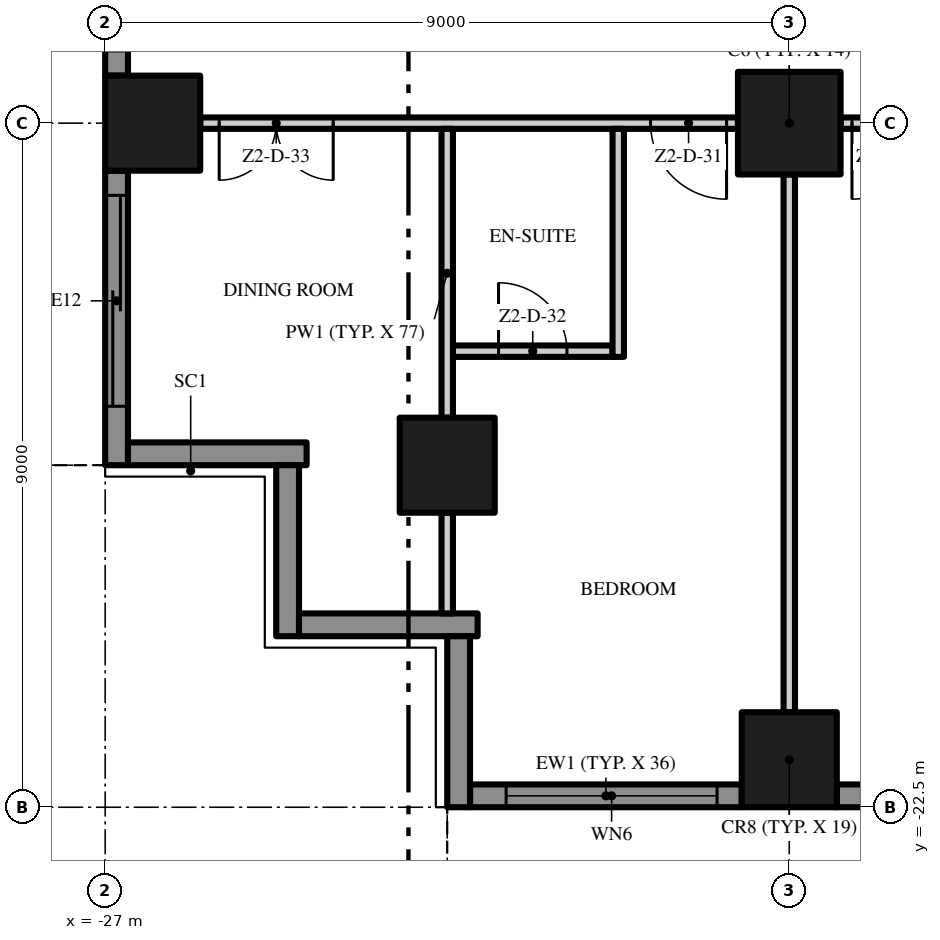
"""IFC4 building model, lengths in metres.
Left out: names, types, materials, properties, quantities, classifications, styles, units other than length and angle.
Written with IfcOpenShell. Run it as: python <this file> out.ifc"""

import sys

from ifc_helpers import new_model, si_unit, direction, frame, frame_2d, origin, origin_2d, place, context, subcontext, project, spatial, polyline, rectangle, outline, extrude, element, fill, save


model = new_model("IFC4")
c1 = context("Model", 3, precision=1e-05, world=origin(), true_north=direction((0.0, 1.0)))
c2 = subcontext(c1, "Body", "Model", "MODEL_VIEW")
j1 = project(units=[si_unit("LENGTHUNIT", "METRE"), si_unit("PLANEANGLEUNIT", "RADIAN")], contexts=[c1])
p1 = place(None, origin())
s1 = spatial("IfcSite", under=j1, at=p1, CompositionType="ELEMENT")
p2 = place(p1, origin())
s2 = spatial("IfcBuilding", under=s1, at=p2, CompositionType="ELEMENT")
p3 = place(p2, frame((0.0, 0.0, 103.6)))
s3 = spatial("IfcBuildingStorey", under=s2, at=p3, CompositionType="ELEMENT", Elevation=103.6)
p4 = place(p3, frame((-18.0, -13.5, 0.0), z_axis=(0.0, 0.0, 1.0), x_axis=(1.0, 0.0, 0.0)))
e1 = element("IfcColumn", 1, at=p4, inside=s3, PredefinedType="COLUMN", context=c2, shape_type="SweptSolid", body=[
    extrude(rectangle(XDim=1.35, YDim=1.35, at=origin_2d()), origin(), (0.0, 0.0, 1.0), 3.5),
])
for number, where, z_axis, x_axis in (
    (2, (-18.0, -21.875, 0.0), (0.0, 0.0, 1.0), (1.0, 0.0, 0.0)),
    (3, (-26.375, -13.5, 0.0), (0.0, 0.0, 1.0), (1.0, 0.0, 0.0)),
    (4, (-22.5, -18.0, 0.0), (0.0, 0.0, 1.0), (1.0, 0.0, 0.0)),
):
    element("IfcColumn", number, at=place(p3, frame(where, z_axis=z_axis, x_axis=x_axis)), inside=s3, PredefinedType="COLUMN", context=c2, shape_type="SweptSolid", body=[
        extrude(rectangle(XDim=1.25, YDim=1.25, at=origin_2d()), origin(), (0.0, 0.0, 1.0), 3.5),
    ])
p5 = place(p3, frame((-18.625, -22.35, 0.0), z_axis=(0.0, 0.0, 1.0), x_axis=(-1.0, 0.0, 0.0)))
e5 = element("IfcWall", 5, at=p5, inside=s3, PredefinedType="SOLIDWALL", context=c2, shape_type="SweptSolid", body=[
    extrude(rectangle(XDim=3.575, YDim=0.3, at=frame_2d((1.788, 0.0))), origin(), (0.0, 0.0, 1.0), 3.5),
])
p6 = place(p5, frame((0.325, 0.0, 0.45)))
e6 = element("IfcOpeningElement", 6, at=p6, cuts=e5, PredefinedType="OPENING", context=c2, shape_type="SweptSolid", body=[
    extrude(rectangle(XDim=2.775, YDim=2.65, at=frame_2d((1.387, 1.325))), frame((0.0, 0.16, 0.0), z_axis=(0.0, -1.0, 0.0), x_axis=(1.0, 0.0, 0.0)), (0.0, 0.0, 1.0), 0.32),
])
p7 = place(p3, frame((-9.625, -22.35, 0.0), z_axis=(0.0, 0.0, 1.0), x_axis=(-1.0, 0.0, 0.0)))
e7 = element("IfcWall", 7, at=p7, inside=s3, PredefinedType="SOLIDWALL", context=c2, shape_type="SweptSolid", body=[
    extrude(rectangle(XDim=7.75, YDim=0.3, at=frame_2d((3.875, 0.0))), origin(), (0.0, 0.0, 1.0), 3.5),
])
p8 = place(p7, frame((4.65, 0.0, 0.0)))
e8 = element("IfcOpeningElement", 8, at=p8, cuts=e7, PredefinedType="OPENING", context=c2, shape_type="SweptSolid", body=[
    extrude(rectangle(XDim=2.775, YDim=2.4, at=frame_2d((1.387, 1.2))), frame((0.0, 0.16, 0.0), z_axis=(0.0, -1.0, 0.0), x_axis=(1.0, 0.0, 0.0)), (0.0, 0.0, 1.0), 0.32),
])
p9 = place(p7, frame((0.325, 0.0, 0.45)))
e9 = element("IfcOpeningElement", 9, at=p9, cuts=e7, PredefinedType="OPENING", context=c2, shape_type="SweptSolid", body=[
    extrude(rectangle(XDim=2.775, YDim=2.65, at=frame_2d((1.387, 1.325))), frame((0.0, 0.16, 0.0), z_axis=(0.0, -1.0, 0.0), x_axis=(1.0, 0.0, 0.0)), (0.0, 0.0, 1.0), 0.32),
])
p10 = place(p3, frame((-26.85, -12.875, 0.0), z_axis=(0.0, 0.0, 1.0), x_axis=(0.0, 1.0, 0.0)))
e10 = element("IfcWall", 10, at=p10, inside=s3, PredefinedType="SOLIDWALL", context=c2, shape_type="SweptSolid", body=[
    extrude(rectangle(XDim=7.75, YDim=0.3, at=frame_2d((3.875, 0.0))), origin(), (0.0, 0.0, 1.0), 3.5),
])
p11 = place(p10, frame((4.65, 0.0, 0.45)))
e11 = element("IfcOpeningElement", 11, at=p11, cuts=e10, PredefinedType="OPENING", context=c2, shape_type="SweptSolid", body=[
    extrude(rectangle(XDim=2.775, YDim=2.65, at=frame_2d((1.387, 1.325))), frame((0.0, 0.16, 0.0), z_axis=(0.0, -1.0, 0.0), x_axis=(1.0, 0.0, 0.0)), (0.0, 0.0, 1.0), 0.32),
])
p12 = place(p10, frame((0.325, 0.0, 0.45)))
e12 = element("IfcOpeningElement", 12, at=p12, cuts=e10, PredefinedType="OPENING", context=c2, shape_type="SweptSolid", body=[
    extrude(rectangle(XDim=2.775, YDim=2.65, at=frame_2d((1.387, 1.325))), frame((0.0, 0.16, 0.0), z_axis=(0.0, -1.0, 0.0), x_axis=(1.0, 0.0, 0.0)), (0.0, 0.0, 1.0), 0.32),
])
p13 = place(p3, frame((-26.85, -18.0, 0.0), z_axis=(0.0, 0.0, 1.0), x_axis=(0.0, 1.0, 0.0)))
e13 = element("IfcWall", 13, at=p13, inside=s3, PredefinedType="SOLIDWALL", context=c2, shape_type="SweptSolid", body=[
    extrude(rectangle(XDim=3.875, YDim=0.3, at=frame_2d((1.938, 0.0))), origin(), (0.0, 0.0, 1.0), 3.5),
])
p14 = place(p13, frame((0.775, 0.0, 0.0)))
e14 = element("IfcOpeningElement", 14, at=p14, cuts=e13, PredefinedType="OPENING", context=c2, shape_type="SweptSolid", body=[
    extrude(rectangle(XDim=2.775, YDim=2.4, at=frame_2d((1.387, 1.2))), frame((0.0, 0.16, 0.0), z_axis=(0.0, -1.0, 0.0), x_axis=(1.0, 0.0, 0.0)), (0.0, 0.0, 1.0), 0.32),
])
p15 = place(p3, frame((-24.35, -17.85, 0.0), z_axis=(0.0, 0.0, 1.0), x_axis=(-1.0, 0.0, 0.0)))
e15 = element("IfcWall", 15, at=p15, inside=s3, PredefinedType="SOLIDWALL", context=c2, shape_type="SweptSolid", body=[
    extrude(rectangle(XDim=2.35, YDim=0.3, at=frame_2d((1.175, 0.0))), origin(), (0.0, 0.0, 1.0), 3.5),
])
p16 = place(p3, frame((-24.6, -20.25, 0.0), z_axis=(0.0, 0.0, 1.0), x_axis=(0.0, 1.0, 0.0)))
e16 = element("IfcWall", 16, at=p16, inside=s3, PredefinedType="SOLIDWALL", context=c2, shape_type="SweptSolid", body=[
    extrude(rectangle(XDim=2.25, YDim=0.3, at=frame_2d((1.125, 0.0))), origin(), (0.0, 0.0, 1.0), 3.5),
])
p17 = place(p3, frame((-22.1, -20.1, 0.0), z_axis=(0.0, 0.0, 1.0), x_axis=(-1.0, 0.0, 0.0)))
e17 = element("IfcWall", 17, at=p17, inside=s3, PredefinedType="SOLIDWALL", context=c2, shape_type="SweptSolid", body=[
    extrude(rectangle(XDim=2.35, YDim=0.3, at=frame_2d((1.175, 0.0))), origin(), (0.0, 0.0, 1.0), 3.5),
])
p18 = place(p3, frame((-22.35, -22.5, 0.0), z_axis=(0.0, 0.0, 1.0), x_axis=(0.0, 1.0, 0.0)))
e18 = element("IfcWall", 18, at=p18, inside=s3, PredefinedType="SOLIDWALL", context=c2, shape_type="SweptSolid", body=[
    extrude(rectangle(XDim=2.25, YDim=0.3, at=frame_2d((1.125, 0.0))), origin(), (0.0, 0.0, 1.0), 3.5),
])
p19 = place(p3, origin())
e19 = element("IfcWall", 19, at=p19, inside=s3, PredefinedType="USERDEFINED", context=c2, shape_type="SweptSolid", body=[
    extrude(outline(polyline([(-22.5, -23.451), (-21.0, -24.112), (-19.5, -24.845), (-18.0, -25.369), (-16.875, -25.5), (-16.5, -25.485), (-15.0, -25.149), (-13.5, -24.488), (-12.0, -23.755), (-10.5, -23.231), (-9.375, -23.1), (-9.0, -23.115), (-7.5, -23.451), (-6.0, -24.112), (-4.5, -24.845), (-3.0, -25.369), (-1.875, -25.5), (-1.5, -25.485), (0.0, -25.149), (1.5, -24.488), (3.0, -23.755), (4.5, -23.231), (5.625, -23.1), (6.0, -23.115), (7.5, -23.451), (9.0, -24.112), (10.5, -24.845), (12.0, -25.369), (13.125, -25.5), (13.5, -25.485), (15.0, -25.149), (16.5, -24.488), (18.0, -23.755), (19.5, -23.231), (20.625, -23.1), (21.0, -23.115), (22.5, -23.451), (22.555, -23.208), (21.033, -22.866), (20.615, -22.849), (19.444, -22.986), (17.904, -23.524), (16.395, -24.261), (14.921, -24.91), (13.467, -25.236), (13.135, -25.249), (12.056, -25.124), (10.596, -24.614), (9.105, -23.885), (7.579, -23.213), (6.033, -22.866), (5.615, -22.849), (4.444, -22.986), (2.904, -23.524), (1.395, -24.261), (-0.079, -24.91), (-1.533, -25.236), (-1.865, -25.249), (-2.944, -25.124), (-4.404, -24.614), (-5.895, -23.885), (-7.421, -23.213), (-8.967, -22.866), (-9.385, -22.849), (-10.556, -22.986), (-12.096, -23.524), (-13.605, -24.261), (-15.079, -24.91), (-16.533, -25.236), (-16.865, -25.249), (-17.944, -25.124), (-19.404, -24.614), (-20.895, -23.885), (-22.399, -23.223), (-22.5, -23.451)])), origin(), (0.0, 0.0, 1.0), 0.9),
])
p20 = place(p3, origin())
e20 = element("IfcWall", 20, at=p20, inside=s3, PredefinedType="USERDEFINED", context=c2, shape_type="SweptSolid", body=[
    extrude(outline(polyline([(-27.951, 18.0), (-28.612, 16.5), (-29.345, 15.0), (-29.869, 13.5), (-30.0, 12.375), (-29.985, 12.0), (-29.649, 10.5), (-28.988, 9.0), (-28.255, 7.5), (-27.731, 6.0), (-27.6, 4.875), (-27.615, 4.5), (-27.951, 3.0), (-28.612, 1.5), (-29.345, 0.0), (-29.869, -1.5), (-30.0, -2.625), (-29.985, -3.0), (-29.649, -4.5), (-28.988, -6.0), (-28.255, -7.5), (-27.731, -9.0), (-27.6, -10.125), (-27.615, -10.5), (-27.951, -12.0), (-28.612, -13.5), (-29.345, -15.0), (-29.869, -16.5), (-30.0, -17.625), (-29.985, -18.0), (-29.735, -17.99), (-29.749, -17.635), (-29.624, -16.556), (-29.114, -15.096), (-28.385, -13.605), (-27.713, -12.079), (-27.366, -10.533), (-27.349, -10.115), (-27.486, -8.944), (-28.024, -7.404), (-28.761, -5.895), (-29.41, -4.421), (-29.736, -2.967), (-29.749, -2.635), (-29.624, -1.556), (-29.114, -0.096), (-28.385, 1.395), (-27.713, 2.921), (-27.366, 4.467), (-27.349, 4.885), (-27.486, 6.056), (-28.024, 7.596), (-28.761, 9.105), (-29.41, 10.579), (-29.736, 12.033), (-29.749, 12.365), (-29.624, 13.444), (-29.114, 14.904), (-28.385, 16.395), (-27.723, 17.899), (-27.951, 18.0)])), origin(), (0.0, 0.0, 1.0), 0.9),
])
p21 = place(p3, frame((-22.425, -16.5, 0.0), z_axis=(0.0, 0.0, 1.0), x_axis=(1.0, 0.0, 0.0)))
e21 = element("IfcWall", 21, at=p21, inside=s3, PredefinedType="PARTITIONING", context=c2, shape_type="SweptSolid", body=[
    extrude(rectangle(XDim=2.1, YDim=0.15, at=frame_2d((1.05, 0.0))), origin(), (0.0, 0.0, 1.0), 3.5),
])
p22 = place(p21, frame((0.6, 0.0, 0.0)))
e22 = element("IfcOpeningElement", 22, at=p22, cuts=e21, PredefinedType="OPENING", context=c2, shape_type="SweptSolid", body=[
    extrude(rectangle(XDim=0.9, YDim=2.1, at=frame_2d((0.45, 1.05))), frame((0.0, 0.085, 0.0), z_axis=(0.0, -1.0, 0.0), x_axis=(1.0, 0.0, 0.0)), (0.0, 0.0, 1.0), 0.17),
])
p23 = place(p3, frame((-18.675, -13.5, 0.0), z_axis=(0.0, 0.0, 1.0), x_axis=(-1.0, 0.0, 0.0)))
e23 = element("IfcWall", 23, at=p23, inside=s3, PredefinedType="PARTITIONING", context=c2, shape_type="SweptSolid", body=[
    extrude(rectangle(XDim=7.075, YDim=0.15, at=frame_2d((3.538, 0.0))), origin(), (0.0, 0.0, 1.0), 3.5),
])
p24 = place(p23, frame((0.15, 0.0, 0.0)))
e24 = element("IfcOpeningElement", 24, at=p24, cuts=e23, PredefinedType="OPENING", context=c2, shape_type="SweptSolid", body=[
    extrude(rectangle(XDim=1.0, YDim=2.4, at=frame_2d((0.5, 1.2))), frame((0.0, 0.085, 0.0), z_axis=(0.0, -1.0, 0.0), x_axis=(1.0, 0.0, 0.0)), (0.0, 0.0, 1.0), 0.17),
])
p25 = place(p23, frame((5.325, 0.0, 0.0)))
e25 = element("IfcOpeningElement", 25, at=p25, cuts=e23, PredefinedType="OPENING", context=c2, shape_type="SweptSolid", body=[
    extrude(rectangle(XDim=1.5, YDim=2.4, at=frame_2d((0.75, 1.2))), frame((0.0, 0.085, 0.0), z_axis=(0.0, -1.0, 0.0), x_axis=(1.0, 0.0, 0.0)), (0.0, 0.0, 1.0), 0.17),
])
p26 = place(p3, frame((-9.675, -13.5, 0.0), z_axis=(0.0, 0.0, 1.0), x_axis=(-1.0, 0.0, 0.0)))
e26 = element("IfcWall", 26, at=p26, inside=s3, PredefinedType="PARTITIONING", context=c2, shape_type="SweptSolid", body=[
    extrude(rectangle(XDim=7.65, YDim=0.15, at=frame_2d((3.825, 0.0))), origin(), (0.0, 0.0, 1.0), 3.5),
])
p27 = place(p26, frame((0.15, 0.0, 0.0)))
e27 = element("IfcOpeningElement", 27, at=p27, cuts=e26, PredefinedType="OPENING", context=c2, shape_type="SweptSolid", body=[
    extrude(rectangle(XDim=1.0, YDim=2.4, at=frame_2d((0.5, 1.2))), frame((0.0, 0.085, 0.0), z_axis=(0.0, -1.0, 0.0), x_axis=(1.0, 0.0, 0.0)), (0.0, 0.0, 1.0), 0.17),
])
p28 = place(p26, frame((6.5, 0.0, 0.0)))
e28 = element("IfcOpeningElement", 28, at=p28, cuts=e26, PredefinedType="OPENING", context=c2, shape_type="SweptSolid", body=[
    extrude(rectangle(XDim=1.0, YDim=2.4, at=frame_2d((0.5, 1.2))), frame((0.0, 0.085, 0.0), z_axis=(0.0, -1.0, 0.0), x_axis=(1.0, 0.0, 0.0)), (0.0, 0.0, 1.0), 0.17),
])
p29 = place(p3, frame((-22.5, -19.95, 0.0), z_axis=(0.0, 0.0, 1.0), x_axis=(0.0, 1.0, 0.0)))
e29 = element("IfcWall", 29, at=p29, inside=s3, PredefinedType="PARTITIONING", context=c2, shape_type="SweptSolid", body=[
    extrude(rectangle(XDim=1.325, YDim=0.15, at=frame_2d((0.662, 0.0))), origin(), (0.0, 0.0, 1.0), 3.5),
])
p30 = place(p3, frame((-22.5, -17.375, 0.0), z_axis=(0.0, 0.0, 1.0), x_axis=(0.0, 1.0, 0.0)))
e30 = element("IfcWall", 30, at=p30, inside=s3, PredefinedType="PARTITIONING", context=c2, shape_type="SweptSolid", body=[
    extrude(rectangle(XDim=3.8, YDim=0.15, at=frame_2d((1.9, 0.0))), origin(), (0.0, 0.0, 1.0), 3.5),
])
p31 = place(p3, frame((-20.25, -16.575, 0.0), z_axis=(0.0, 0.0, 1.0), x_axis=(0.0, 1.0, 0.0)))
e31 = element("IfcWall", 31, at=p31, inside=s3, PredefinedType="PARTITIONING", context=c2, shape_type="SweptSolid", body=[
    extrude(rectangle(XDim=3.0, YDim=0.15, at=frame_2d((1.5, 0.0))), origin(), (0.0, 0.0, 1.0), 3.5),
])
p32 = place(p3, frame((-18.0, -21.25, 0.0), z_axis=(0.0, 0.0, 1.0), x_axis=(0.0, 1.0, 0.0)))
e32 = element("IfcWall", 32, at=p32, inside=s3, PredefinedType="PARTITIONING", context=c2, shape_type="SweptSolid", body=[
    extrude(rectangle(XDim=7.075, YDim=0.15, at=frame_2d((3.538, 0.0))), origin(), (0.0, 0.0, 1.0), 3.5),
])
p33 = place(p6, origin())
e33 = element("IfcWindow", 33, at=p33, inside=s3, PartitioningType="SINGLE_PANEL", PredefinedType="WINDOW", context=c2, shape_type="SweptSolid", body=[
    extrude(rectangle(XDim=2.775, YDim=2.65, at=frame_2d((1.387, 1.325))), frame((0.0, 0.03, 0.0), z_axis=(0.0, -1.0, 0.0), x_axis=(1.0, 0.0, 0.0)), (0.0, 0.0, 1.0), 0.06),
])
fill(e6, e33)
p34 = place(p14, origin())
e34 = element("IfcDoor", 34, at=p34, inside=s3, OperationType="SINGLE_SWING_LEFT", PredefinedType="DOOR", context=c2, shape_type="SweptSolid", body=[
    extrude(rectangle(XDim=2.775, YDim=2.4, at=frame_2d((1.387, 1.2))), frame((0.0, 0.025, 0.0), z_axis=(0.0, -1.0, 0.0), x_axis=(1.0, 0.0, 0.0)), (0.0, 0.0, 1.0), 0.05),
])
fill(e14, e34)
p35 = place(p28, origin())
e35 = element("IfcDoor", 35, at=p35, inside=s3, OperationType="SINGLE_SWING_RIGHT", PredefinedType="DOOR", context=c2, shape_type="SweptSolid", body=[
    extrude(rectangle(XDim=1.0, YDim=2.4, at=frame_2d((0.5, 1.2))), frame((0.0, 0.025, 0.0), z_axis=(0.0, -1.0, 0.0), x_axis=(1.0, 0.0, 0.0)), (0.0, 0.0, 1.0), 0.05),
])
fill(e28, e35)
p36 = place(p24, origin())
e36 = element("IfcDoor", 36, at=p36, inside=s3, OperationType="SINGLE_SWING_LEFT", PredefinedType="DOOR", context=c2, shape_type="SweptSolid", body=[
    extrude(rectangle(XDim=1.0, YDim=2.4, at=frame_2d((0.5, 1.2))), frame((0.0, 0.025, 0.0), z_axis=(0.0, -1.0, 0.0), x_axis=(1.0, 0.0, 0.0)), (0.0, 0.0, 1.0), 0.05),
])
fill(e24, e36)
p37 = place(p22, origin())
e37 = element("IfcDoor", 37, at=p37, inside=s3, OperationType="SINGLE_SWING_LEFT", PredefinedType="DOOR", context=c2, shape_type="SweptSolid", body=[
    extrude(rectangle(XDim=0.9, YDim=2.1, at=frame_2d((0.45, 1.05))), frame((0.0, 0.025, 0.0), z_axis=(0.0, -1.0, 0.0), x_axis=(1.0, 0.0, 0.0)), (0.0, 0.0, 1.0), 0.05),
])
fill(e22, e37)
p38 = place(p25, origin())
e38 = element("IfcDoor", 38, at=p38, inside=s3, OperationType="DOUBLE_DOOR_SINGLE_SWING", PredefinedType="DOOR", context=c2, shape_type="SweptSolid", body=[
    extrude(rectangle(XDim=1.5, YDim=2.4, at=frame_2d((0.75, 1.2))), frame((0.0, 0.025, 0.0), z_axis=(0.0, -1.0, 0.0), x_axis=(1.0, 0.0, 0.0)), (0.0, 0.0, 1.0), 0.05),
])
fill(e25, e38)
save(model, sys.argv[1])
